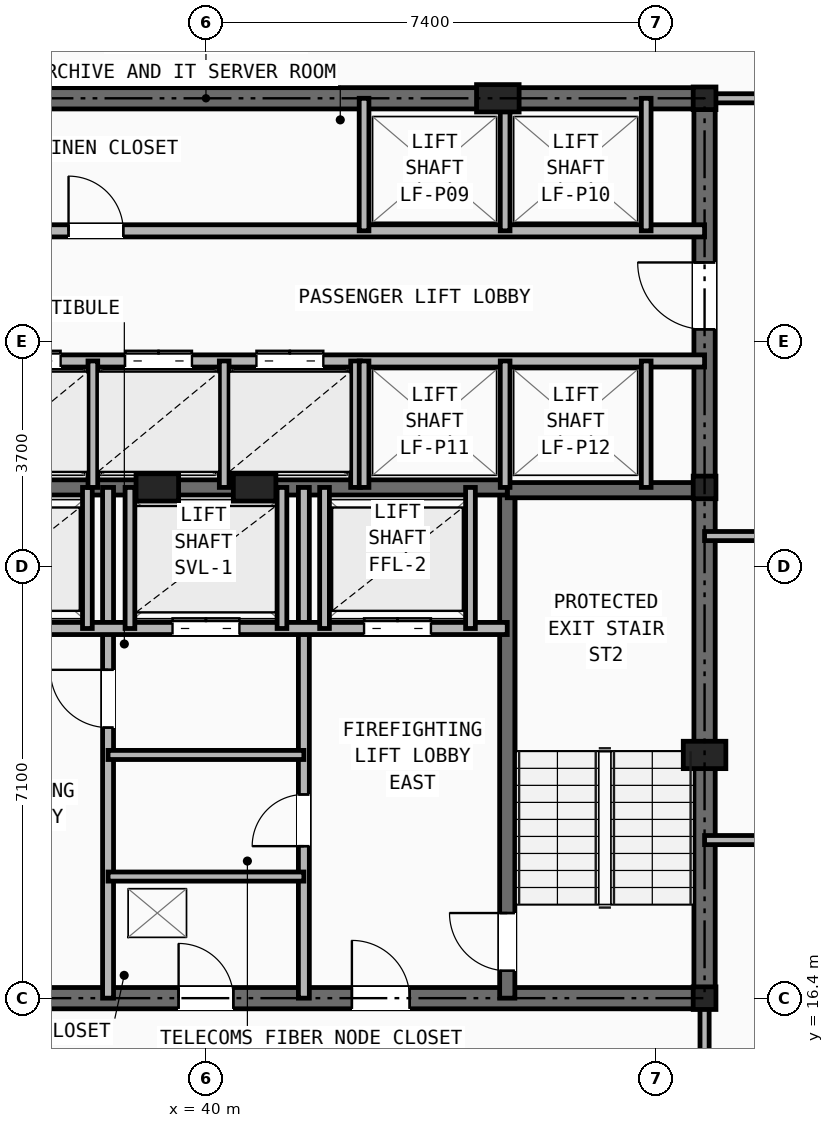
"""IFC4 building model, lengths in metres.
Left out: names, types, materials, properties, quantities, classifications, styles, units other than length and angle.
Written with IfcOpenShell. Run it as: python <this file> out.ifc"""

import sys

from ifc_helpers import new_model, si_unit, direction, frame, frame_2d, origin, origin_2d, place, context, subcontext, project, spatial, rectangle, i_section, extrude, element, fill, save


model = new_model("IFC4")
c1 = context("Model", 3, precision=1e-05, world=origin(), true_north=direction((0.0, 1.0)))
c2 = subcontext(c1, "Body", "Model", "MODEL_VIEW")
j1 = project(units=[si_unit("LENGTHUNIT", "METRE"), si_unit("PLANEANGLEUNIT", "RADIAN")], contexts=[c1])
p1 = place(None, origin())
s1 = spatial("IfcSite", under=j1, at=p1, CompositionType="ELEMENT")
p2 = place(p1, origin())
s2 = spatial("IfcBuilding", under=s1, at=p2, CompositionType="ELEMENT")
p3 = place(p2, frame((0.0, 0.0, 153.95)))
s3 = spatial("IfcBuildingStorey", under=s2, at=p3, CompositionType="ELEMENT", Elevation=153.95)
for number, where, z_axis, x_axis in (
    (1, (48.2, 16.4, 0.0), (0.0, 0.0, 1.0), (1.0, 0.0, 0.0)),
    (2, (48.2, 24.8, 0.0), (0.0, 0.0, 1.0), (1.0, 0.0, 0.0)),
    (3, (48.2, 31.2, 0.0), (0.0, 0.0, 1.0), (1.0, 0.0, 0.0)),
):
    element("IfcColumn", number, at=place(p3, frame(where, z_axis=z_axis, x_axis=x_axis)), inside=s3, PredefinedType="COLUMN", context=c2, shape_type="SweptSolid", body=[
        extrude(i_section(OverallWidth=0.374, OverallDepth=0.372, WebThickness=0.016, FlangeThickness=0.026, at=origin_2d()), origin(), (0.0, 0.0, 1.0), 3.45),
    ])
for number, where, z_axis, x_axis in (
    (4, (48.2, 20.4, 0.0), (0.0, 0.0, 1.0), (1.0, 0.0, 0.0)),
    (5, (44.8, 31.2, 0.0), (0.0, 0.0, 1.0), (1.0, 0.0, 0.0)),
    (6, (39.2, 24.8, 0.0), (0.0, 0.0, 1.0), (1.0, 0.0, 0.0)),
    (7, (40.8, 24.8, 0.0), (0.0, 0.0, 1.0), (1.0, 0.0, 0.0)),
):
    element("IfcColumn", number, at=place(p3, frame(where, z_axis=z_axis, x_axis=x_axis)), inside=s3, PredefinedType="PILASTER", context=c2, shape_type="SweptSolid", body=[
        extrude(rectangle(XDim=0.7, YDim=0.45, at=origin_2d()), origin(), (0.0, 0.0, 1.0), 3.45),
    ])
p4 = place(p3, frame((31.8, 16.4, 0.0), z_axis=(0.0, 0.0, 1.0), x_axis=(1.0, 0.0, 0.0)))
e8 = element("IfcWall", 8, at=p4, inside=s3, PredefinedType="SHEAR", context=c2, shape_type="SweptSolid", body=[
    extrude(rectangle(XDim=16.4, YDim=0.35, at=frame_2d((8.2, 0.0))), origin(), (0.0, 0.0, 1.0), 3.15),
])
p5 = place(p4, frame((7.75, 0.0, 0.0)))
e9 = element("IfcOpeningElement", 9, at=p5, cuts=e8, PredefinedType="OPENING", context=c2, shape_type="SweptSolid", body=[
    extrude(rectangle(XDim=0.9, YDim=2.1, at=frame_2d((0.45, 1.05))), frame((0.0, 0.185, 0.0), z_axis=(0.0, -1.0, 0.0), x_axis=(1.0, 0.0, 0.0)), (0.0, 0.0, 1.0), 0.37),
])
p6 = place(p4, frame((4.2, 0.0, 0.0)))
e10 = element("IfcOpeningElement", 10, at=p6, cuts=e8, PredefinedType="OPENING", context=c2, shape_type="SweptSolid", body=[
    extrude(rectangle(XDim=0.95, YDim=2.1, at=frame_2d((0.475, 1.05))), frame((0.0, 0.185, 0.0), z_axis=(0.0, -1.0, 0.0), x_axis=(1.0, 0.0, 0.0)), (0.0, 0.0, 1.0), 0.37),
])
p7 = place(p4, frame((10.6, 0.0, 0.0)))
e11 = element("IfcOpeningElement", 11, at=p7, cuts=e8, PredefinedType="OPENING", context=c2, shape_type="SweptSolid", body=[
    extrude(rectangle(XDim=0.95, YDim=2.1, at=frame_2d((0.475, 1.05))), frame((0.0, 0.185, 0.0), z_axis=(0.0, -1.0, 0.0), x_axis=(1.0, 0.0, 0.0)), (0.0, 0.0, 1.0), 0.37),
])
p8 = place(p3, frame((31.8, 31.2, 0.0), z_axis=(0.0, 0.0, 1.0), x_axis=(1.0, 0.0, 0.0)))
e12 = element("IfcWall", 12, at=p8, inside=s3, PredefinedType="SHEAR", context=c2, shape_type="SweptSolid", body=[
    extrude(rectangle(XDim=16.4, YDim=0.35, at=frame_2d((8.2, 0.0))), origin(), (0.0, 0.0, 1.0), 3.15),
])
p9 = place(p3, frame((48.2, 16.4, 0.0), z_axis=(0.0, 0.0, 1.0), x_axis=(0.0, 1.0, 0.0)))
e13 = element("IfcWall", 13, at=p9, inside=s3, PredefinedType="SHEAR", context=c2, shape_type="SweptSolid", body=[
    extrude(rectangle(XDim=14.8, YDim=0.35, at=frame_2d((7.4, 0.0))), origin(), (0.0, 0.0, 1.0), 3.15),
])
p10 = place(p9, frame((11.0, 0.0, 0.0)))
e14 = element("IfcOpeningElement", 14, at=p10, cuts=e13, PredefinedType="OPENING", context=c2, shape_type="SweptSolid", body=[
    extrude(rectangle(XDim=1.1, YDim=2.15, at=frame_2d((0.55, 1.075))), frame((0.0, 0.185, 0.0), z_axis=(0.0, -1.0, 0.0), x_axis=(1.0, 0.0, 0.0)), (0.0, 0.0, 1.0), 0.37),
])
p11 = place(p3, frame((44.955, 16.4, 0.0), z_axis=(0.0, 0.0, 1.0), x_axis=(0.0, 1.0, 0.0)))
e15 = element("IfcWall", 15, at=p11, inside=s3, PredefinedType="SHEAR", context=c2, shape_type="SweptSolid", body=[
    extrude(rectangle(XDim=8.4, YDim=0.25, at=frame_2d((4.2, 0.0))), origin(), (0.0, 0.0, 1.0), 3.15),
])
p12 = place(p11, frame((0.45, 0.0, 0.0)))
e16 = element("IfcOpeningElement", 16, at=p12, cuts=e15, PredefinedType="OPENING", context=c2, shape_type="SweptSolid", body=[
    extrude(rectangle(XDim=0.95, YDim=2.1, at=frame_2d((0.475, 1.05))), frame((0.0, 0.135, 0.0), z_axis=(0.0, -1.0, 0.0), x_axis=(1.0, 0.0, 0.0)), (0.0, 0.0, 1.0), 0.27),
])
p13 = place(p3, frame((44.955, 24.755, 0.0), z_axis=(0.0, 0.0, 1.0), x_axis=(1.0, 0.0, 0.0)))
e17 = element("IfcWall", 17, at=p13, inside=s3, PredefinedType="SHEAR", context=c2, shape_type="SweptSolid", body=[
    extrude(rectangle(XDim=3.245, YDim=0.25, at=frame_2d((1.623, 0.0))), origin(), (0.0, 0.0, 1.0), 3.15),
])
p14 = place(p3, frame((35.045, 24.8, 0.0), z_axis=(0.0, 0.0, 1.0), x_axis=(1.0, 0.0, 0.0)))
e18 = element("IfcWall", 18, at=p14, inside=s3, PredefinedType="SHEAR", context=c2, shape_type="SweptSolid", body=[
    extrude(rectangle(XDim=9.91, YDim=0.25, at=frame_2d((4.955, 0.0))), origin(), (0.0, 0.0, 1.0), 3.15),
])
p15 = place(p3, frame((38.39, 16.4, 0.0), z_axis=(0.0, 0.0, 1.0), x_axis=(0.0, 1.0, 0.0)))
e19 = element("IfcWall", 19, at=p15, inside=s3, PredefinedType="PARTITIONING", context=c2, shape_type="SweptSolid", body=[
    extrude(rectangle(XDim=8.4, YDim=0.18, at=frame_2d((4.2, 0.0))), origin(), (0.0, 0.0, 1.0), 2.601),
])
p16 = place(p15, frame((4.45, 0.0, 0.0)))
e20 = element("IfcOpeningElement", 20, at=p16, cuts=e19, PredefinedType="OPENING", context=c2, shape_type="SweptSolid", body=[
    extrude(rectangle(XDim=0.95, YDim=2.1, at=frame_2d((0.475, 1.05))), frame((0.0, 0.1, 0.0), z_axis=(0.0, -1.0, 0.0), x_axis=(1.0, 0.0, 0.0)), (0.0, 0.0, 1.0), 0.2),
])
p17 = place(p3, frame((41.61, 16.4, 0.0), z_axis=(0.0, 0.0, 1.0), x_axis=(0.0, 1.0, 0.0)))
e21 = element("IfcWall", 21, at=p17, inside=s3, PredefinedType="PARTITIONING", context=c2, shape_type="SweptSolid", body=[
    extrude(rectangle(XDim=8.4, YDim=0.18, at=frame_2d((4.2, 0.0))), origin(), (0.0, 0.0, 1.0), 2.601),
])
p18 = place(p17, frame((2.5, 0.0, 0.0)))
e22 = element("IfcOpeningElement", 22, at=p18, cuts=e21, PredefinedType="OPENING", context=c2, shape_type="SweptSolid", body=[
    extrude(rectangle(XDim=0.85, YDim=2.05, at=frame_2d((0.425, 1.025))), frame((0.0, 0.1, 0.0), z_axis=(0.0, -1.0, 0.0), x_axis=(1.0, 0.0, 0.0)), (0.0, 0.0, 1.0), 0.2),
])
p19 = place(p3, frame((35.045, 22.48, 0.0), z_axis=(0.0, 0.0, 1.0), x_axis=(1.0, 0.0, 0.0)))
e23 = element("IfcWall", 23, at=p19, inside=s3, PredefinedType="SOLIDWALL", context=c2, shape_type="SweptSolid", body=[
    extrude(rectangle(XDim=9.91, YDim=0.2, at=frame_2d((4.955, 0.0))), origin(), (0.0, 0.0, 1.0), 3.15),
])
p20 = place(p19, frame((1.255, 0.0, 0.0)))
e24 = element("IfcOpeningElement", 24, at=p20, cuts=e23, PredefinedType="OPENING", context=c2, shape_type="SweptSolid", body=[
    extrude(rectangle(XDim=1.1, YDim=2.15, at=frame_2d((0.55, 1.075))), frame((0.0, 0.11, 0.0), z_axis=(0.0, -1.0, 0.0), x_axis=(1.0, 0.0, 0.0)), (0.0, 0.0, 1.0), 0.22),
])
p21 = place(p19, frame((7.555, 0.0, 0.0)))
e25 = element("IfcOpeningElement", 25, at=p21, cuts=e23, PredefinedType="OPENING", context=c2, shape_type="SweptSolid", body=[
    extrude(rectangle(XDim=1.1, YDim=2.15, at=frame_2d((0.55, 1.075))), frame((0.0, 0.11, 0.0), z_axis=(0.0, -1.0, 0.0), x_axis=(1.0, 0.0, 0.0)), (0.0, 0.0, 1.0), 0.22),
])
p22 = place(p19, frame((4.405, 0.0, 0.0)))
e26 = element("IfcOpeningElement", 26, at=p22, cuts=e23, PredefinedType="OPENING", context=c2, shape_type="SweptSolid", body=[
    extrude(rectangle(XDim=1.1, YDim=2.15, at=frame_2d((0.55, 1.075))), frame((0.0, 0.11, 0.0), z_axis=(0.0, -1.0, 0.0), x_axis=(1.0, 0.0, 0.0)), (0.0, 0.0, 1.0), 0.22),
])
for number, where, z_axis, x_axis in (
    (27, (38.39, 18.4, 0.0), (0.0, 0.0, 1.0), (1.0, 0.0, 0.0)),
    (28, (38.39, 20.4, 0.0), (0.0, 0.0, 1.0), (1.0, 0.0, 0.0)),
):
    element("IfcWall", number, at=place(p3, frame(where, z_axis=z_axis, x_axis=x_axis)), inside=s3, PredefinedType="PARTITIONING", context=c2, shape_type="SweptSolid", body=[
        extrude(rectangle(XDim=3.22, YDim=0.15, at=frame_2d((1.61, 0.0))), origin(), (0.0, 0.0, 1.0), 3.15),
    ])
for number, where, z_axis, x_axis in (
    (29, (38.05, 22.48, 0.0), (0.0, 0.0, 1.0), (0.0, 1.0, 0.0)),
    (30, (41.95, 22.48, 0.0), (0.0, 0.0, 1.0), (0.0, 1.0, 0.0)),
    (31, (44.35, 22.48, 0.0), (0.0, 0.0, 1.0), (0.0, 1.0, 0.0)),
    (32, (38.75, 22.48, 0.0), (0.0, 0.0, 1.0), (0.0, 1.0, 0.0)),
    (33, (41.25, 22.48, 0.0), (0.0, 0.0, 1.0), (0.0, 1.0, 0.0)),
):
    element("IfcWall", number, at=place(p3, frame(where, z_axis=z_axis, x_axis=x_axis)), inside=s3, PredefinedType="SOLIDWALL", context=c2, shape_type="SweptSolid", body=[
        extrude(rectangle(XDim=2.32, YDim=0.16, at=frame_2d((1.16, 0.0))), origin(), (0.0, 0.0, 1.0), 3.15),
    ])
p23 = place(p3, frame((31.8, 29.02, 0.0), z_axis=(0.0, 0.0, 1.0), x_axis=(1.0, 0.0, 0.0)))
e34 = element("IfcWall", 34, at=p23, inside=s3, PredefinedType="SOLIDWALL", context=c2, shape_type="SweptSolid", body=[
    extrude(rectangle(XDim=16.4, YDim=0.2, at=frame_2d((8.2, 0.0))), origin(), (0.0, 0.0, 1.0), 2.601),
])
p24 = place(p23, frame((0.55, 0.0, 0.0)))
e35 = element("IfcOpeningElement", 35, at=p24, cuts=e34, PredefinedType="OPENING", context=c2, shape_type="SweptSolid", body=[
    extrude(rectangle(XDim=0.85, YDim=2.05, at=frame_2d((0.425, 1.025))), frame((0.0, 0.11, 0.0), z_axis=(0.0, -1.0, 0.0), x_axis=(1.0, 0.0, 0.0)), (0.0, 0.0, 1.0), 0.22),
])
p25 = place(p23, frame((5.94, 0.0, 0.0)))
e36 = element("IfcOpeningElement", 36, at=p25, cuts=e34, PredefinedType="OPENING", context=c2, shape_type="SweptSolid", body=[
    extrude(rectangle(XDim=0.9, YDim=2.1, at=frame_2d((0.45, 1.05))), frame((0.0, 0.11, 0.0), z_axis=(0.0, -1.0, 0.0), x_axis=(1.0, 0.0, 0.0)), (0.0, 0.0, 1.0), 0.22),
])
p26 = place(p3, frame((31.8, 26.88, 0.0), z_axis=(0.0, 0.0, 1.0), x_axis=(1.0, 0.0, 0.0)))
e37 = element("IfcWall", 37, at=p26, inside=s3, PredefinedType="SOLIDWALL", context=c2, shape_type="SweptSolid", body=[
    extrude(rectangle(XDim=16.4, YDim=0.2, at=frame_2d((8.2, 0.0))), origin(), (0.0, 0.0, 1.0), 2.601),
])
p27 = place(p26, frame((0.55, 0.0, 0.0)))
e38 = element("IfcOpeningElement", 38, at=p27, cuts=e37, PredefinedType="OPENING", context=c2, shape_type="SweptSolid", body=[
    extrude(rectangle(XDim=0.85, YDim=2.05, at=frame_2d((0.425, 1.025))), frame((0.0, 0.11, 0.0), z_axis=(0.0, -1.0, 0.0), x_axis=(1.0, 0.0, 0.0)), (0.0, 0.0, 1.0), 0.22),
])
p28 = place(p26, frame((2.55, 0.0, 0.0)))
e39 = element("IfcOpeningElement", 39, at=p28, cuts=e37, PredefinedType="OPENING", context=c2, shape_type="SweptSolid", body=[
    extrude(rectangle(XDim=1.1, YDim=2.15, at=frame_2d((0.55, 1.075))), frame((0.0, 0.11, 0.0), z_axis=(0.0, -1.0, 0.0), x_axis=(1.0, 0.0, 0.0)), (0.0, 0.0, 1.0), 0.22),
])
p29 = place(p26, frame((4.71, 0.0, 0.0)))
e40 = element("IfcOpeningElement", 40, at=p29, cuts=e37, PredefinedType="OPENING", context=c2, shape_type="SweptSolid", body=[
    extrude(rectangle(XDim=1.1, YDim=2.15, at=frame_2d((0.55, 1.075))), frame((0.0, 0.11, 0.0), z_axis=(0.0, -1.0, 0.0), x_axis=(1.0, 0.0, 0.0)), (0.0, 0.0, 1.0), 0.22),
])
p30 = place(p26, frame((6.87, 0.0, 0.0)))
e41 = element("IfcOpeningElement", 41, at=p30, cuts=e37, PredefinedType="OPENING", context=c2, shape_type="SweptSolid", body=[
    extrude(rectangle(XDim=1.1, YDim=2.15, at=frame_2d((0.55, 1.075))), frame((0.0, 0.11, 0.0), z_axis=(0.0, -1.0, 0.0), x_axis=(1.0, 0.0, 0.0)), (0.0, 0.0, 1.0), 0.22),
])
p31 = place(p26, frame((9.03, 0.0, 0.0)))
e42 = element("IfcOpeningElement", 42, at=p31, cuts=e37, PredefinedType="OPENING", context=c2, shape_type="SweptSolid", body=[
    extrude(rectangle(XDim=1.1, YDim=2.15, at=frame_2d((0.55, 1.075))), frame((0.0, 0.11, 0.0), z_axis=(0.0, -1.0, 0.0), x_axis=(1.0, 0.0, 0.0)), (0.0, 0.0, 1.0), 0.22),
])
for number, where, z_axis, x_axis in (
    (43, (38.14, 24.8, 0.0), (0.0, 0.0, 1.0), (0.0, 1.0, 0.0)),
    (44, (40.3, 24.8, 0.0), (0.0, 0.0, 1.0), (0.0, 1.0, 0.0)),
    (45, (42.46, 24.8, 0.0), (0.0, 0.0, 1.0), (0.0, 1.0, 0.0)),
):
    element("IfcWall", number, at=place(p3, frame(where, z_axis=z_axis, x_axis=x_axis)), inside=s3, PredefinedType="SOLIDWALL", context=c2, shape_type="SweptSolid", body=[
        extrude(rectangle(XDim=2.08, YDim=0.16, at=frame_2d((1.04, 0.0))), origin(), (0.0, 0.0, 1.0), 3.15),
    ])
for number, where, z_axis, x_axis in (
    (46, (42.6, 29.02, 0.0), (0.0, 0.0, 1.0), (0.0, 1.0, 0.0)),
    (47, (44.92, 29.02, 0.0), (0.0, 0.0, 1.0), (0.0, 1.0, 0.0)),
    (48, (47.24, 29.02, 0.0), (0.0, 0.0, 1.0), (0.0, 1.0, 0.0)),
):
    element("IfcWall", number, at=place(p3, frame(where, z_axis=z_axis, x_axis=x_axis)), inside=s3, PredefinedType="SOLIDWALL", context=c2, shape_type="SweptSolid", body=[
        extrude(rectangle(XDim=2.18, YDim=0.16, at=frame_2d((1.09, 0.0))), origin(), (0.0, 0.0, 1.0), 2.601),
    ])
for number, where, z_axis, x_axis in (
    (49, (42.6, 24.8, 0.0), (0.0, 0.0, 1.0), (0.0, 1.0, 0.0)),
    (50, (44.92, 24.8, 0.0), (0.0, 0.0, 1.0), (0.0, 1.0, 0.0)),
    (51, (47.24, 24.8, 0.0), (0.0, 0.0, 1.0), (0.0, 1.0, 0.0)),
):
    element("IfcWall", number, at=place(p3, frame(where, z_axis=z_axis, x_axis=x_axis)), inside=s3, PredefinedType="SOLIDWALL", context=c2, shape_type="SweptSolid", body=[
        extrude(rectangle(XDim=2.08, YDim=0.16, at=frame_2d((1.04, 0.0))), origin(), (0.0, 0.0, 1.0), 3.15),
    ])
p32 = place(p3, frame((48.2, 14.1, 0.0), z_axis=(0.0, 0.0, 1.0), x_axis=(0.0, 1.0, 0.0)))
e52 = element("IfcWall", 52, at=p32, inside=s3, PredefinedType="PARTITIONING", context=c2, shape_type="SweptSolid", body=[
    extrude(rectangle(XDim=2.3, YDim=0.15, at=frame_2d((1.15, 0.0))), origin(), (0.0, 0.0, 1.0), 2.601),
])
p33 = place(p3, frame((48.2, 31.2, 0.0), z_axis=(0.0, 0.0, 1.0), x_axis=(1.0, 0.0, 0.0)))
e53 = element("IfcWall", 53, at=p33, inside=s3, PredefinedType="PARTITIONING", context=c2, shape_type="SweptSolid", body=[
    extrude(rectangle(XDim=8.008, YDim=0.15, at=frame_2d((4.004, 0.0))), origin(), (0.0, 0.0, 1.0), 2.165),
])
p34 = place(p3, frame((48.2, 19.0, 0.0), z_axis=(0.0, 0.0, 1.0), x_axis=(1.0, 0.0, 0.0)))
e54 = element("IfcWall", 54, at=p34, inside=s3, PredefinedType="PARTITIONING", context=c2, shape_type="SweptSolid", body=[
    extrude(rectangle(XDim=15.438, YDim=0.15, at=frame_2d((7.719, 0.0))), origin(), (0.0, 0.0, 1.0), 2.529),
])
p35 = place(p34, frame((1.4, 0.0, 0.0)))
e55 = element("IfcOpeningElement", 55, at=p35, cuts=e54, PredefinedType="OPENING", context=c2, shape_type="SweptSolid", body=[
    extrude(rectangle(XDim=0.95, YDim=2.1, at=frame_2d((0.475, 1.05))), frame((0.0, 0.085, 0.0), z_axis=(0.0, -1.0, 0.0), x_axis=(1.0, 0.0, 0.0)), (0.0, 0.0, 1.0), 0.17),
])
p36 = place(p3, frame((48.2, 24.0, 0.0), z_axis=(0.0, 0.0, 1.0), x_axis=(1.0, 0.0, 0.0)))
e56 = element("IfcWall", 56, at=p36, inside=s3, PredefinedType="PARTITIONING", context=c2, shape_type="SweptSolid", body=[
    extrude(rectangle(XDim=12.393, YDim=0.15, at=frame_2d((6.197, 0.0))), origin(), (0.0, 0.0, 1.0), 2.529),
])
p37 = place(p36, frame((1.4, 0.0, 0.0)))
e57 = element("IfcOpeningElement", 57, at=p37, cuts=e56, PredefinedType="OPENING", context=c2, shape_type="SweptSolid", body=[
    extrude(rectangle(XDim=0.95, YDim=2.1, at=frame_2d((0.475, 1.05))), frame((0.0, 0.085, 0.0), z_axis=(0.0, -1.0, 0.0), x_axis=(1.0, 0.0, 0.0)), (0.0, 0.0, 1.0), 0.17),
])
p38 = place(p5, origin())
e58 = element("IfcDoor", 58, at=p38, inside=s3, OperationType="SINGLE_SWING_LEFT", PredefinedType="DOOR", context=c2, shape_type="SweptSolid", body=[
    extrude(rectangle(XDim=0.9, YDim=2.1, at=frame_2d((0.45, 1.05))), frame((0.0, 0.025, 0.0), z_axis=(0.0, -1.0, 0.0), x_axis=(1.0, 0.0, 0.0)), (0.0, 0.0, 1.0), 0.05),
])
fill(e9, e58)
p39 = place(p18, origin())
e59 = element("IfcDoor", 59, at=p39, inside=s3, OperationType="SINGLE_SWING_LEFT", PredefinedType="DOOR", context=c2, shape_type="SweptSolid", body=[
    extrude(rectangle(XDim=0.85, YDim=2.05, at=frame_2d((0.425, 1.025))), frame((0.0, 0.025, 0.0), z_axis=(0.0, -1.0, 0.0), x_axis=(1.0, 0.0, 0.0)), (0.0, 0.0, 1.0), 0.05),
])
fill(e22, e59)
p40 = place(p16, origin())
e60 = element("IfcDoor", 60, at=p40, inside=s3, OperationType="SINGLE_SWING_RIGHT", PredefinedType="DOOR", context=c2, shape_type="SweptSolid", body=[
    extrude(rectangle(XDim=0.95, YDim=2.1, at=frame_2d((0.475, 1.05))), frame((0.0, 0.025, 0.0), z_axis=(0.0, -1.0, 0.0), x_axis=(1.0, 0.0, 0.0)), (0.0, 0.0, 1.0), 0.05),
])
fill(e20, e60)
p41 = place(p12, origin())
e61 = element("IfcDoor", 61, at=p41, inside=s3, OperationType="SINGLE_SWING_RIGHT", PredefinedType="DOOR", context=c2, shape_type="SweptSolid", body=[
    extrude(rectangle(XDim=0.95, YDim=2.1, at=frame_2d((0.475, 1.05))), frame((0.0, 0.025, 0.0), z_axis=(0.0, -1.0, 0.0), x_axis=(1.0, 0.0, 0.0)), (0.0, 0.0, 1.0), 0.05),
])
fill(e16, e61)
p42 = place(p7, origin())
e62 = element("IfcDoor", 62, at=p42, inside=s3, OperationType="SINGLE_SWING_LEFT", PredefinedType="DOOR", context=c2, shape_type="SweptSolid", body=[
    extrude(rectangle(XDim=0.95, YDim=2.1, at=frame_2d((0.475, 1.05))), frame((0.0, 0.025, 0.0), z_axis=(0.0, -1.0, 0.0), x_axis=(1.0, 0.0, 0.0)), (0.0, 0.0, 1.0), 0.05),
])
fill(e11, e62)
p43 = place(p21, origin())
e63 = element("IfcDoor", 63, at=p43, inside=s3, OperationType="DOUBLE_DOOR_SLIDING", PredefinedType="DOOR", context=c2, shape_type="SweptSolid", body=[
    extrude(rectangle(XDim=1.1, YDim=2.15, at=frame_2d((0.55, 1.075))), frame((0.0, 0.025, 0.0), z_axis=(0.0, -1.0, 0.0), x_axis=(1.0, 0.0, 0.0)), (0.0, 0.0, 1.0), 0.05),
])
fill(e25, e63)
p44 = place(p22, origin())
e64 = element("IfcDoor", 64, at=p44, inside=s3, OperationType="DOUBLE_DOOR_SLIDING", PredefinedType="DOOR", context=c2, shape_type="SweptSolid", body=[
    extrude(rectangle(XDim=1.1, YDim=2.15, at=frame_2d((0.55, 1.075))), frame((0.0, 0.025, 0.0), z_axis=(0.0, -1.0, 0.0), x_axis=(1.0, 0.0, 0.0)), (0.0, 0.0, 1.0), 0.05),
])
fill(e26, e64)
p45 = place(p10, origin())
e65 = element("IfcDoor", 65, at=p45, inside=s3, OperationType="SINGLE_SWING_RIGHT", PredefinedType="DOOR", context=c2, shape_type="SweptSolid", body=[
    extrude(rectangle(XDim=1.1, YDim=2.15, at=frame_2d((0.55, 1.075))), frame((0.0, 0.025, 0.0), z_axis=(0.0, -1.0, 0.0), x_axis=(1.0, 0.0, 0.0)), (0.0, 0.0, 1.0), 0.05),
])
fill(e14, e65)
p46 = place(p25, origin())
e66 = element("IfcDoor", 66, at=p46, inside=s3, OperationType="SINGLE_SWING_LEFT", PredefinedType="DOOR", context=c2, shape_type="SweptSolid", body=[
    extrude(rectangle(XDim=0.9, YDim=2.1, at=frame_2d((0.45, 1.05))), frame((0.0, 0.025, 0.0), z_axis=(0.0, -1.0, 0.0), x_axis=(1.0, 0.0, 0.0)), (0.0, 0.0, 1.0), 0.05),
])
fill(e36, e66)
p47 = place(p29, origin())
e67 = element("IfcDoor", 67, at=p47, inside=s3, OperationType="DOUBLE_DOOR_SLIDING", PredefinedType="DOOR", context=c2, shape_type="SweptSolid", body=[
    extrude(rectangle(XDim=1.1, YDim=2.15, at=frame_2d((0.55, 1.075))), frame((0.0, 0.025, 0.0), z_axis=(0.0, -1.0, 0.0), x_axis=(1.0, 0.0, 0.0)), (0.0, 0.0, 1.0), 0.05),
])
fill(e40, e67)
p48 = place(p30, origin())
e68 = element("IfcDoor", 68, at=p48, inside=s3, OperationType="DOUBLE_DOOR_SLIDING", PredefinedType="DOOR", context=c2, shape_type="SweptSolid", body=[
    extrude(rectangle(XDim=1.1, YDim=2.15, at=frame_2d((0.55, 1.075))), frame((0.0, 0.025, 0.0), z_axis=(0.0, -1.0, 0.0), x_axis=(1.0, 0.0, 0.0)), (0.0, 0.0, 1.0), 0.05),
])
fill(e41, e68)
p49 = place(p31, origin())
e69 = element("IfcDoor", 69, at=p49, inside=s3, OperationType="DOUBLE_DOOR_SLIDING", PredefinedType="DOOR", context=c2, shape_type="SweptSolid", body=[
    extrude(rectangle(XDim=1.1, YDim=2.15, at=frame_2d((0.55, 1.075))), frame((0.0, 0.025, 0.0), z_axis=(0.0, -1.0, 0.0), x_axis=(1.0, 0.0, 0.0)), (0.0, 0.0, 1.0), 0.05),
])
fill(e42, e69)
save(model, sys.argv[1])
